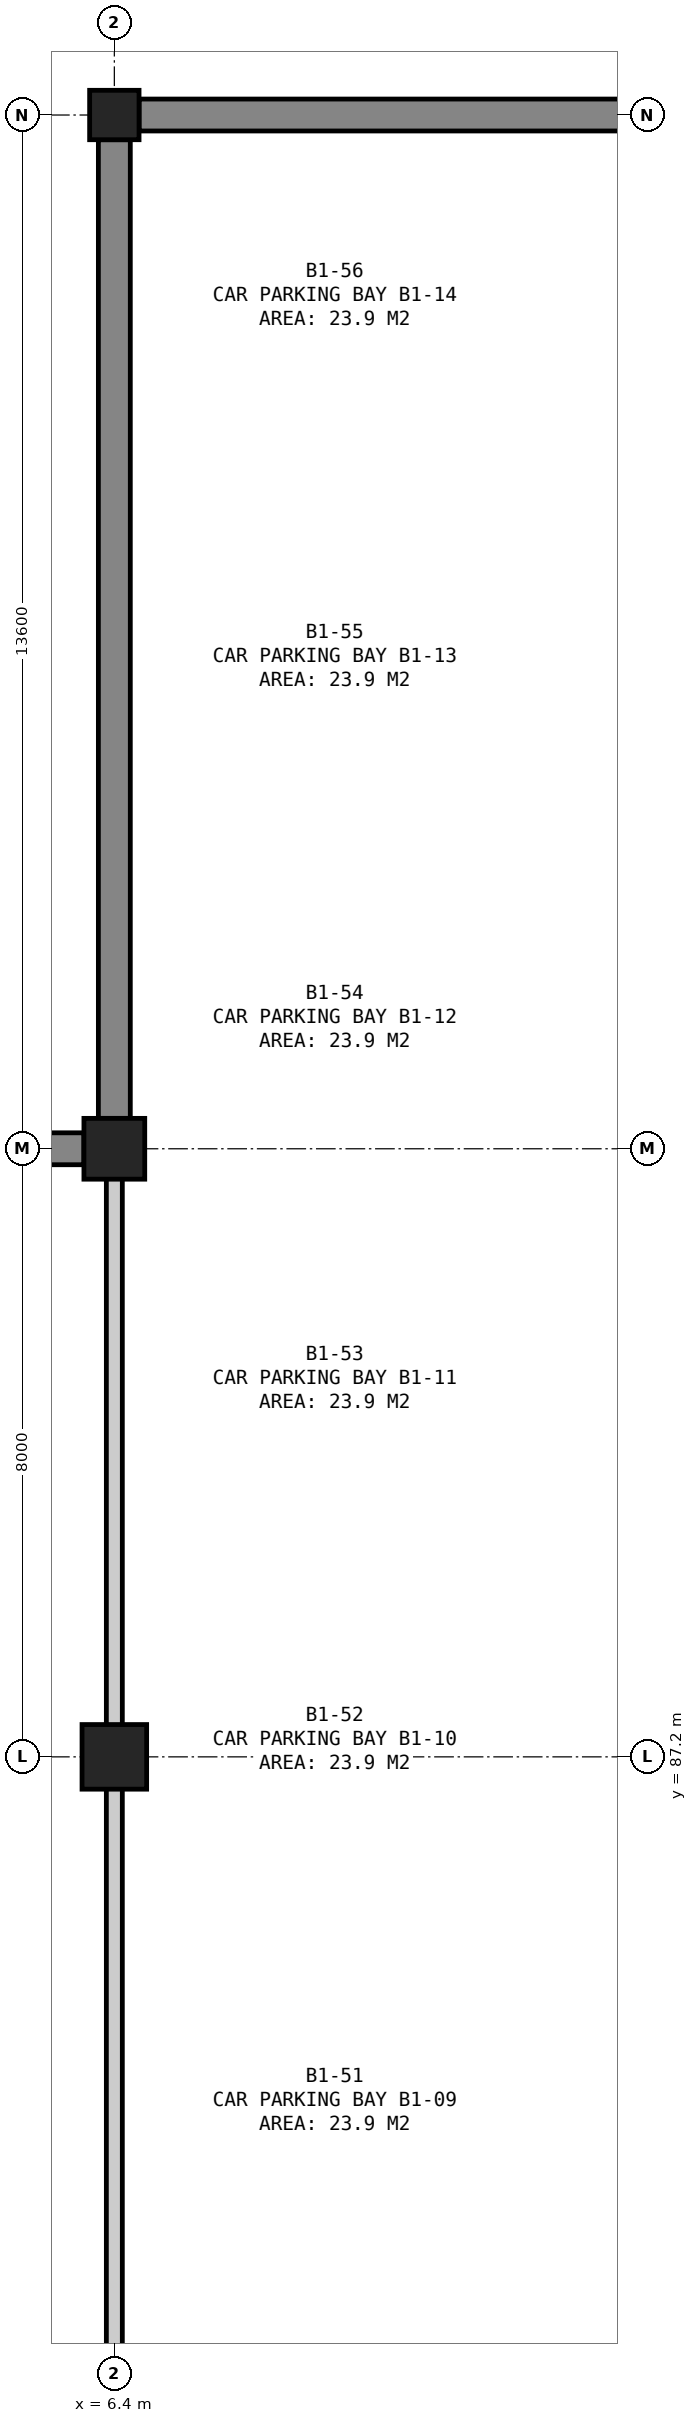
"""IFC4 building model, lengths in metres.
Left out: names, types, materials, properties, quantities, classifications, styles, units other than length and angle.
Written with IfcOpenShell. Run it as: python <this file> out.ifc"""

import sys

from ifc_helpers import new_model, si_unit, direction, frame, frame_2d, origin, origin_2d, place, context, subcontext, project, spatial, rectangle, extrude, element, save


model = new_model("IFC4")
c1 = context("Model", 3, precision=1e-05, world=origin(), true_north=direction((0.0, 1.0)))
c2 = subcontext(c1, "Body", "Model", "MODEL_VIEW")
j1 = project(units=[si_unit("LENGTHUNIT", "METRE"), si_unit("PLANEANGLEUNIT", "RADIAN")], contexts=[c1])
p1 = place(None, origin())
s1 = spatial("IfcSite", under=j1, at=p1, CompositionType="ELEMENT")
p2 = place(p1, origin())
s2 = spatial("IfcBuilding", under=s1, at=p2, CompositionType="ELEMENT")
p3 = place(p2, frame((0.0, 0.0, -4.5)))
s3 = spatial("IfcBuildingStorey", under=s2, at=p3, CompositionType="ELEMENT", Elevation=-4.5)
p4 = place(p3, frame((6.4, 87.2, 0.0), z_axis=(0.0, 0.0, 1.0), x_axis=(1.0, 0.0, 0.0)))
e1 = element("IfcColumn", 1, at=p4, inside=s3, PredefinedType="COLUMN", context=c2, shape_type="SweptSolid", body=[
    extrude(rectangle(XDim=0.85, YDim=0.85, at=origin_2d()), origin(), (0.0, 0.0, 1.0), 4.5),
])
p5 = place(p3, frame((6.4, 95.2, 0.0), z_axis=(0.0, 0.0, 1.0), x_axis=(1.0, 0.0, 0.0)))
e2 = element("IfcColumn", 2, at=p5, inside=s3, PredefinedType="COLUMN", context=c2, shape_type="SweptSolid", body=[
    extrude(rectangle(XDim=0.8, YDim=0.8, at=origin_2d()), origin(), (0.0, 0.0, 1.0), 4.5),
])
p6 = place(p3, frame((6.4, 108.8, 0.0), z_axis=(0.0, 0.0, 1.0), x_axis=(1.0, 0.0, 0.0)))
e3 = element("IfcColumn", 3, at=p6, inside=s3, PredefinedType="COLUMN", context=c2, shape_type="SweptSolid", body=[
    extrude(rectangle(XDim=0.65, YDim=0.65, at=origin_2d()), origin(), (0.0, 0.0, 1.0), 4.5),
])
p7 = place(p3, frame((15.8, 108.8, 0.0), z_axis=(0.0, 0.0, 1.0), x_axis=(-1.0, 0.0, 0.0)))
e4 = element("IfcWall", 4, at=p7, inside=s3, PredefinedType="SOLIDWALL", context=c2, shape_type="SweptSolid", body=[
    extrude(rectangle(XDim=9.075, YDim=0.42, at=frame_2d((4.538, 0.0))), origin(), (0.0, 0.0, 1.0), 4.08),
])
p8 = place(p3, frame((6.4, 108.475, 0.0), z_axis=(0.0, 0.0, 1.0), x_axis=(0.0, -1.0, 0.0)))
e5 = element("IfcWall", 5, at=p8, inside=s3, PredefinedType="SOLIDWALL", context=c2, shape_type="SweptSolid", body=[
    extrude(rectangle(XDim=12.875, YDim=0.42, at=frame_2d((6.438, 0.0))), origin(), (0.0, 0.0, 1.0), 4.08),
])
p9 = place(p3, frame((6.0, 95.2, 0.0), z_axis=(0.0, 0.0, 1.0), x_axis=(-1.0, 0.0, 0.0)))
e6 = element("IfcWall", 6, at=p9, inside=s3, PredefinedType="SOLIDWALL", context=c2, shape_type="SweptSolid", body=[
    extrude(rectangle(XDim=5.575, YDim=0.42, at=frame_2d((2.788, 0.0))), origin(), (0.0, 0.0, 1.0), 4.08),
])
p10 = place(p3, frame((6.4, 43.34, 0.0), z_axis=(0.0, 0.0, 1.0), x_axis=(0.0, 1.0, 0.0)))
e7 = element("IfcWall", 7, at=p10, inside=s3, PredefinedType="SOLIDWALL", context=c2, shape_type="SweptSolid", body=[
    extrude(rectangle(XDim=52.12, YDim=0.21, at=frame_2d((26.06, 0.0))), origin(), (0.0, 0.0, 1.0), 3.325),
])
save(model, sys.argv[1])
